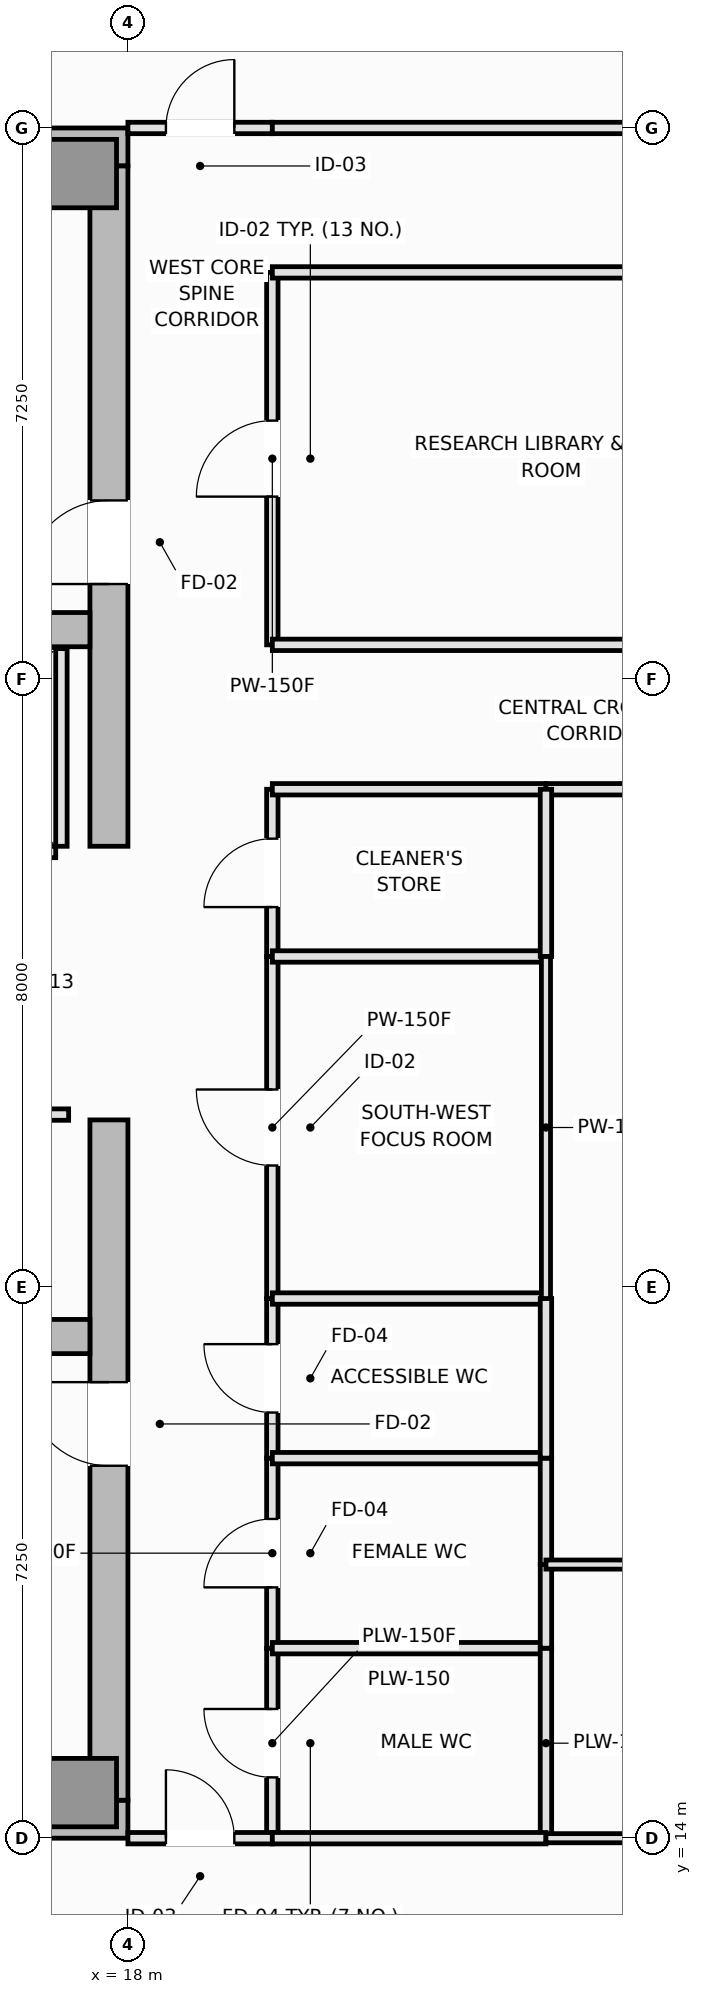
"""IFC4 building model, lengths in metres.
Left out: names, types, materials, properties, quantities, classifications, styles, units other than length and angle.
Written with IfcOpenShell. Run it as: python <this file> out.ifc"""

import sys

from ifc_helpers import new_model, si_unit, direction, frame, frame_2d, origin, origin_2d, place, context, subcontext, project, spatial, rectangle, extrude, element, fill, save


model = new_model("IFC4")
c1 = context("Model", 3, precision=1e-05, world=origin(), true_north=direction((0.0, 1.0)))
c2 = subcontext(c1, "Body", "Model", "MODEL_VIEW")
j1 = project(units=[si_unit("LENGTHUNIT", "METRE"), si_unit("PLANEANGLEUNIT", "RADIAN")], contexts=[c1])
p1 = place(None, origin())
s1 = spatial("IfcSite", under=j1, at=p1, CompositionType="ELEMENT")
p2 = place(p1, origin())
s2 = spatial("IfcBuilding", under=s1, at=p2, CompositionType="ELEMENT")
p3 = place(p2, frame((0.0, 0.0, 284.75)))
s3 = spatial("IfcBuildingStorey", under=s2, at=p3, CompositionType="ELEMENT", Elevation=284.75)
for number, where, z_axis, x_axis in (
    (1, (4.5, 14.25, 0.0), (0.0, 0.0, 1.0), (1.0, 0.0, 0.0)),
    (2, (4.5, 36.25, 0.0), (0.0, 0.0, 1.0), (1.0, 0.0, 0.0)),
):
    element("IfcWall", number, at=place(p3, frame(where, z_axis=z_axis, x_axis=x_axis)), inside=s3, PredefinedType="SHEAR", context=c2, shape_type="SweptSolid", body=[
        extrude(rectangle(XDim=13.5, YDim=0.5, at=frame_2d((6.75, 0.0))), origin(), (0.0, 0.0, 1.0), 3.55),
    ])
p4 = place(p3, frame((17.75, 14.5, 0.0), z_axis=(0.0, 0.0, 1.0), x_axis=(0.0, 1.0, 0.0)))
e3 = element("IfcWall", 3, at=p4, inside=s3, PredefinedType="SHEAR", context=c2, shape_type="SweptSolid", body=[
    extrude(rectangle(XDim=8.95, YDim=0.5, at=frame_2d((4.475, 0.0))), origin(), (0.0, 0.0, 1.0), 3.55),
])
p5 = place(p4, frame((4.4, 0.0, 0.0)))
e4 = element("IfcOpeningElement", 4, at=p5, cuts=e3, PredefinedType="OPENING", context=c2, shape_type="SweptSolid", body=[
    extrude(rectangle(XDim=1.1, YDim=2.15, at=frame_2d((0.55, 1.075))), frame((0.0, 0.26, 0.0), z_axis=(0.0, -1.0, 0.0), x_axis=(1.0, 0.0, 0.0)), (0.0, 0.0, 1.0), 0.52),
])
p6 = place(p3, frame((17.75, 27.05, 0.0), z_axis=(0.0, 0.0, 1.0), x_axis=(0.0, 1.0, 0.0)))
e5 = element("IfcWall", 5, at=p6, inside=s3, PredefinedType="SHEAR", context=c2, shape_type="SweptSolid", body=[
    extrude(rectangle(XDim=8.95, YDim=0.5, at=frame_2d((4.475, 0.0))), origin(), (0.0, 0.0, 1.0), 3.55),
])
p7 = place(p6, frame((3.45, 0.0, 0.0)))
e6 = element("IfcOpeningElement", 6, at=p7, cuts=e5, PredefinedType="OPENING", context=c2, shape_type="SweptSolid", body=[
    extrude(rectangle(XDim=1.1, YDim=2.15, at=frame_2d((0.55, 1.075))), frame((0.0, 0.26, 0.0), z_axis=(0.0, -1.0, 0.0), x_axis=(1.0, 0.0, 0.0)), (0.0, 0.0, 1.0), 0.52),
])
for number, where, z_axis, x_axis in (
    (7, (5.0, 20.6, 0.0), (0.0, 0.0, 1.0), (1.0, 0.0, 0.0)),
    (8, (5.0, 29.9, 0.0), (0.0, 0.0, 1.0), (1.0, 0.0, 0.0)),
):
    element("IfcWall", number, at=place(p3, frame(where, z_axis=z_axis, x_axis=x_axis)), inside=s3, PredefinedType="SHEAR", context=c2, shape_type="SweptSolid", body=[
        extrude(rectangle(XDim=12.5, YDim=0.45, at=frame_2d((6.25, 0.0))), origin(), (0.0, 0.0, 1.0), 3.55),
    ])
for number, where, z_axis, x_axis in (
    (9, (17.4, 14.6, 0.0), (0.0, 0.0, 1.0), (1.0, 0.0, 0.0)),
    (10, (17.4, 35.9, 0.0), (0.0, 0.0, 1.0), (1.0, 0.0, 0.0)),
):
    element("IfcColumn", number, at=place(p3, frame(where, z_axis=z_axis, x_axis=x_axis)), inside=s3, PredefinedType="PILASTER", context=c2, shape_type="SweptSolid", body=[
        extrude(rectangle(XDim=0.9, YDim=0.9, at=origin_2d()), origin(), (0.0, 0.0, 1.0), 3.55),
    ])
p8 = place(p3, frame((14.5, 26.975, 0.0), z_axis=(0.0, 0.0, 1.0), x_axis=(1.0, 0.0, 0.0)))
e11 = element("IfcWall", 11, at=p8, inside=s3, PredefinedType="PARTITIONING", context=c2, shape_type="SweptSolid", body=[
    extrude(rectangle(XDim=2.55, YDim=0.15, at=frame_2d((1.275, 0.0))), origin(), (0.0, 0.0, 1.0), 3.39),
])
p9 = place(p8, frame((0.625, 0.0, 0.0)))
e12 = element("IfcOpeningElement", 12, at=p9, cuts=e11, PredefinedType="OPENING", context=c2, shape_type="SweptSolid", body=[
    extrude(rectangle(XDim=1.3, YDim=2.2, at=frame_2d((0.65, 1.1))), frame((0.0, 0.085, 0.0), z_axis=(0.0, -1.0, 0.0), x_axis=(1.0, 0.0, 0.0)), (0.0, 0.0, 1.0), 0.17),
])
p10 = place(p3, frame((17.125, 27.05, 0.0), z_axis=(0.0, 0.0, 1.0), x_axis=(0.0, 1.0, 0.0)))
e13 = element("IfcWall", 13, at=p10, inside=s3, PredefinedType="PARTITIONING", context=c2, shape_type="SweptSolid", body=[
    extrude(rectangle(XDim=2.6, YDim=0.15, at=frame_2d((1.3, 0.0))), origin(), (0.0, 0.0, 1.0), 3.39),
])
p11 = place(p3, frame((14.33, 23.52, 0.0), z_axis=(0.0, 0.0, 1.0), x_axis=(1.0, 0.0, 0.0)))
e14 = element("IfcWall", 14, at=p11, inside=s3, PredefinedType="PARTITIONING", context=c2, shape_type="SweptSolid", body=[
    extrude(rectangle(XDim=2.89, YDim=0.15, at=frame_2d((1.445, 0.0))), origin(), (0.0, 0.0, 1.0), 3.39),
])
p12 = place(p11, frame((1.053, 0.0, 0.0)))
e15 = element("IfcOpeningElement", 15, at=p12, cuts=e14, PredefinedType="OPENING", context=c2, shape_type="SweptSolid", body=[
    extrude(rectangle(XDim=0.9, YDim=2.1, at=frame_2d((0.45, 1.05))), frame((0.0, 0.085, 0.0), z_axis=(0.0, -1.0, 0.0), x_axis=(1.0, 0.0, 0.0)), (0.0, 0.0, 1.0), 0.17),
])
p13 = place(p3, frame((19.9, 29.7, 0.0), z_axis=(0.0, 0.0, 1.0), x_axis=(0.0, 1.0, 0.0)))
e16 = element("IfcWall", 16, at=p13, inside=s3, PredefinedType="PARTITIONING", context=c2, shape_type="SweptSolid", body=[
    extrude(rectangle(XDim=4.9, YDim=0.15, at=frame_2d((2.45, 0.0))), origin(), (0.0, 0.0, 1.0), 3.39),
])
p14 = place(p13, frame((1.95, 0.0, 0.0)))
e17 = element("IfcOpeningElement", 17, at=p14, cuts=e16, PredefinedType="OPENING", context=c2, shape_type="SweptSolid", body=[
    extrude(rectangle(XDim=1.0, YDim=2.15, at=frame_2d((0.5, 1.075))), frame((0.0, 0.085, 0.0), z_axis=(0.0, -1.0, 0.0), x_axis=(1.0, 0.0, 0.0)), (0.0, 0.0, 1.0), 0.17),
])
p15 = place(p3, frame((19.9, 14.0, 0.0), z_axis=(0.0, 0.0, 1.0), x_axis=(0.0, 1.0, 0.0)))
e18 = element("IfcWall", 18, at=p15, inside=s3, PredefinedType="PLUMBINGWALL", context=c2, shape_type="SweptSolid", body=[
    extrude(rectangle(XDim=2.5, YDim=0.15, at=frame_2d((1.25, 0.0))), origin(), (0.0, 0.0, 1.0), 3.39),
])
p16 = place(p15, frame((0.8, 0.0, 0.0)))
e19 = element("IfcOpeningElement", 19, at=p16, cuts=e18, PredefinedType="OPENING", context=c2, shape_type="SweptSolid", body=[
    extrude(rectangle(XDim=0.9, YDim=2.1, at=frame_2d((0.45, 1.05))), frame((0.0, 0.085, 0.0), z_axis=(0.0, -1.0, 0.0), x_axis=(1.0, 0.0, 0.0)), (0.0, 0.0, 1.0), 0.17),
])
p17 = place(p3, frame((19.9, 16.5, 0.0), z_axis=(0.0, 0.0, 1.0), x_axis=(0.0, 1.0, 0.0)))
e20 = element("IfcWall", 20, at=p17, inside=s3, PredefinedType="PLUMBINGWALL", context=c2, shape_type="SweptSolid", body=[
    extrude(rectangle(XDim=2.5, YDim=0.15, at=frame_2d((1.25, 0.0))), origin(), (0.0, 0.0, 1.0), 3.39),
])
p18 = place(p17, frame((0.8, 0.0, 0.0)))
e21 = element("IfcOpeningElement", 21, at=p18, cuts=e20, PredefinedType="OPENING", context=c2, shape_type="SweptSolid", body=[
    extrude(rectangle(XDim=0.9, YDim=2.1, at=frame_2d((0.45, 1.05))), frame((0.0, 0.085, 0.0), z_axis=(0.0, -1.0, 0.0), x_axis=(1.0, 0.0, 0.0)), (0.0, 0.0, 1.0), 0.17),
])
p19 = place(p3, frame((19.9, 19.0, 0.0), z_axis=(0.0, 0.0, 1.0), x_axis=(0.0, 1.0, 0.0)))
e22 = element("IfcWall", 22, at=p19, inside=s3, PredefinedType="PLUMBINGWALL", context=c2, shape_type="SweptSolid", body=[
    extrude(rectangle(XDim=2.1, YDim=0.15, at=frame_2d((1.05, 0.0))), origin(), (0.0, 0.0, 1.0), 3.39),
])
p20 = place(p19, frame((0.6, 0.0, 0.0)))
e23 = element("IfcOpeningElement", 23, at=p20, cuts=e22, PredefinedType="OPENING", context=c2, shape_type="SweptSolid", body=[
    extrude(rectangle(XDim=0.9, YDim=2.1, at=frame_2d((0.45, 1.05))), frame((0.0, 0.085, 0.0), z_axis=(0.0, -1.0, 0.0), x_axis=(1.0, 0.0, 0.0)), (0.0, 0.0, 1.0), 0.17),
])
p21 = place(p3, frame((19.9, 25.6, 0.0), z_axis=(0.0, 0.0, 1.0), x_axis=(0.0, 1.0, 0.0)))
e24 = element("IfcWall", 24, at=p21, inside=s3, PredefinedType="PLUMBINGWALL", context=c2, shape_type="SweptSolid", body=[
    extrude(rectangle(XDim=2.2, YDim=0.15, at=frame_2d((1.1, 0.0))), origin(), (0.0, 0.0, 1.0), 3.39),
])
p22 = place(p21, frame((0.65, 0.0, 0.0)))
e25 = element("IfcOpeningElement", 25, at=p22, cuts=e24, PredefinedType="OPENING", context=c2, shape_type="SweptSolid", body=[
    extrude(rectangle(XDim=0.9, YDim=2.1, at=frame_2d((0.45, 1.05))), frame((0.0, 0.085, 0.0), z_axis=(0.0, -1.0, 0.0), x_axis=(1.0, 0.0, 0.0)), (0.0, 0.0, 1.0), 0.17),
])
p23 = place(p3, frame((19.9, 21.1, 0.0), z_axis=(0.0, 0.0, 1.0), x_axis=(0.0, 1.0, 0.0)))
e26 = element("IfcWall", 26, at=p23, inside=s3, PredefinedType="PARTITIONING", context=c2, shape_type="SweptSolid", body=[
    extrude(rectangle(XDim=4.5, YDim=0.15, at=frame_2d((2.25, 0.0))), origin(), (0.0, 0.0, 1.0), 3.39),
])
p24 = place(p23, frame((1.75, 0.0, 0.0)))
e27 = element("IfcOpeningElement", 27, at=p24, cuts=e26, PredefinedType="OPENING", context=c2, shape_type="SweptSolid", body=[
    extrude(rectangle(XDim=1.0, YDim=2.15, at=frame_2d((0.5, 1.075))), frame((0.0, 0.085, 0.0), z_axis=(0.0, -1.0, 0.0), x_axis=(1.0, 0.0, 0.0)), (0.0, 0.0, 1.0), 0.17),
])
p25 = place(p3, frame((18.0, 14.0, 0.0), z_axis=(0.0, 0.0, 1.0), x_axis=(1.0, 0.0, 0.0)))
e28 = element("IfcWall", 28, at=p25, inside=s3, PredefinedType="PARTITIONING", context=c2, shape_type="SweptSolid", body=[
    extrude(rectangle(XDim=1.9, YDim=0.15, at=frame_2d((0.95, 0.0))), origin(), (0.0, 0.0, 1.0), 3.39),
])
p26 = place(p25, frame((0.5, 0.0, 0.0)))
e29 = element("IfcOpeningElement", 29, at=p26, cuts=e28, PredefinedType="OPENING", context=c2, shape_type="SweptSolid", body=[
    extrude(rectangle(XDim=0.9, YDim=2.1, at=frame_2d((0.45, 1.05))), frame((0.0, 0.085, 0.0), z_axis=(0.0, -1.0, 0.0), x_axis=(1.0, 0.0, 0.0)), (0.0, 0.0, 1.0), 0.17),
])
p27 = place(p3, frame((18.0, 36.5, 0.0), z_axis=(0.0, 0.0, 1.0), x_axis=(1.0, 0.0, 0.0)))
e30 = element("IfcWall", 30, at=p27, inside=s3, PredefinedType="PARTITIONING", context=c2, shape_type="SweptSolid", body=[
    extrude(rectangle(XDim=1.9, YDim=0.15, at=frame_2d((0.95, 0.0))), origin(), (0.0, 0.0, 1.0), 3.39),
])
p28 = place(p27, frame((0.5, 0.0, 0.0)))
e31 = element("IfcOpeningElement", 31, at=p28, cuts=e30, PredefinedType="OPENING", context=c2, shape_type="SweptSolid", body=[
    extrude(rectangle(XDim=0.9, YDim=2.1, at=frame_2d((0.45, 1.05))), frame((0.0, 0.085, 0.0), z_axis=(0.0, -1.0, 0.0), x_axis=(1.0, 0.0, 0.0)), (0.0, 0.0, 1.0), 0.17),
])
p29 = place(p3, frame((19.9, 29.7, 0.0), z_axis=(0.0, 0.0, 1.0), x_axis=(1.0, 0.0, 0.0)))
e32 = element("IfcWall", 32, at=p29, inside=s3, PredefinedType="PARTITIONING", context=c2, shape_type="SweptSolid", body=[
    extrude(rectangle(XDim=6.89, YDim=0.15, at=frame_2d((3.445, 0.0))), origin(), (0.0, 0.0, 1.0), 3.39),
])
p30 = place(p3, frame((19.9, 27.8, 0.0), z_axis=(0.0, 0.0, 1.0), x_axis=(1.0, 0.0, 0.0)))
e33 = element("IfcWall", 33, at=p30, inside=s3, PredefinedType="PLUMBINGWALL", context=c2, shape_type="SweptSolid", body=[
    extrude(rectangle(XDim=3.6, YDim=0.15, at=frame_2d((1.8, 0.0))), origin(), (0.0, 0.0, 1.0), 3.39),
])
p31 = place(p3, frame((23.5, 27.8, 0.0), z_axis=(0.0, 0.0, 1.0), x_axis=(1.0, 0.0, 0.0)))
e34 = element("IfcWall", 34, at=p31, inside=s3, PredefinedType="PARTITIONING", context=c2, shape_type="SweptSolid", body=[
    extrude(rectangle(XDim=12.8, YDim=0.15, at=frame_2d((6.4, 0.0))), origin(), (0.0, 0.0, 1.0), 3.39),
])
p32 = place(p31, frame((5.9, 0.0, 0.0)))
e35 = element("IfcOpeningElement", 35, at=p32, cuts=e34, PredefinedType="OPENING", context=c2, shape_type="SweptSolid", body=[
    extrude(rectangle(XDim=1.0, YDim=2.15, at=frame_2d((0.5, 1.075))), frame((0.0, 0.085, 0.0), z_axis=(0.0, -1.0, 0.0), x_axis=(1.0, 0.0, 0.0)), (0.0, 0.0, 1.0), 0.17),
])
p33 = place(p3, frame((19.9, 34.6, 0.0), z_axis=(0.0, 0.0, 1.0), x_axis=(1.0, 0.0, 0.0)))
e36 = element("IfcWall", 36, at=p33, inside=s3, PredefinedType="PARTITIONING", context=c2, shape_type="SweptSolid", body=[
    extrude(rectangle(XDim=6.89, YDim=0.15, at=frame_2d((3.445, 0.0))), origin(), (0.0, 0.0, 1.0), 3.39),
])
p34 = place(p3, frame((19.9, 36.5, 0.0), z_axis=(0.0, 0.0, 1.0), x_axis=(1.0, 0.0, 0.0)))
e37 = element("IfcWall", 37, at=p34, inside=s3, PredefinedType="PARTITIONING", context=c2, shape_type="SweptSolid", body=[
    extrude(rectangle(XDim=9.9, YDim=0.15, at=frame_2d((4.95, 0.0))), origin(), (0.0, 0.0, 1.0), 3.39),
])
p35 = place(p3, frame((19.9, 16.5, 0.0), z_axis=(0.0, 0.0, 1.0), x_axis=(1.0, 0.0, 0.0)))
e38 = element("IfcWall", 38, at=p35, inside=s3, PredefinedType="PLUMBINGWALL", context=c2, shape_type="SweptSolid", body=[
    extrude(rectangle(XDim=3.6, YDim=0.15, at=frame_2d((1.8, 0.0))), origin(), (0.0, 0.0, 1.0), 3.39),
])
p36 = place(p3, frame((23.5, 14.0, 0.0), z_axis=(0.0, 0.0, 1.0), x_axis=(0.0, 1.0, 0.0)))
e39 = element("IfcWall", 39, at=p36, inside=s3, PredefinedType="PLUMBINGWALL", context=c2, shape_type="SweptSolid", body=[
    extrude(rectangle(XDim=2.5, YDim=0.15, at=frame_2d((1.25, 0.0))), origin(), (0.0, 0.0, 1.0), 3.39),
])
for number, where, z_axis, x_axis in (
    (40, (19.9, 14.0, 0.0), (0.0, 0.0, 1.0), (1.0, 0.0, 0.0)),
    (41, (19.9, 19.0, 0.0), (0.0, 0.0, 1.0), (1.0, 0.0, 0.0)),
):
    element("IfcWall", number, at=place(p3, frame(where, z_axis=z_axis, x_axis=x_axis)), inside=s3, PredefinedType="PLUMBINGWALL", context=c2, shape_type="SweptSolid", body=[
        extrude(rectangle(XDim=3.6, YDim=0.15, at=frame_2d((1.8, 0.0))), origin(), (0.0, 0.0, 1.0), 3.39),
    ])
p37 = place(p3, frame((23.5, 16.5, 0.0), z_axis=(0.0, 0.0, 1.0), x_axis=(0.0, 1.0, 0.0)))
e42 = element("IfcWall", 42, at=p37, inside=s3, PredefinedType="PLUMBINGWALL", context=c2, shape_type="SweptSolid", body=[
    extrude(rectangle(XDim=1.1, YDim=0.15, at=frame_2d((0.55, 0.0))), origin(), (0.0, 0.0, 1.0), 3.39),
])
p38 = place(p3, frame((23.5, 17.6, 0.0), z_axis=(0.0, 0.0, 1.0), x_axis=(0.0, 1.0, 0.0)))
e43 = element("IfcWall", 43, at=p38, inside=s3, PredefinedType="PLUMBINGWALL", context=c2, shape_type="SweptSolid", body=[
    extrude(rectangle(XDim=1.4, YDim=0.15, at=frame_2d((0.7, 0.0))), origin(), (0.0, 0.0, 1.0), 3.39),
])
p39 = place(p3, frame((19.9, 21.1, 0.0), z_axis=(0.0, 0.0, 1.0), x_axis=(1.0, 0.0, 0.0)))
e44 = element("IfcWall", 44, at=p39, inside=s3, PredefinedType="PLUMBINGWALL", context=c2, shape_type="SweptSolid", body=[
    extrude(rectangle(XDim=3.6, YDim=0.15, at=frame_2d((1.8, 0.0))), origin(), (0.0, 0.0, 1.0), 3.39),
])
p40 = place(p3, frame((23.5, 19.0, 0.0), z_axis=(0.0, 0.0, 1.0), x_axis=(0.0, 1.0, 0.0)))
e45 = element("IfcWall", 45, at=p40, inside=s3, PredefinedType="PLUMBINGWALL", context=c2, shape_type="SweptSolid", body=[
    extrude(rectangle(XDim=2.1, YDim=0.15, at=frame_2d((1.05, 0.0))), origin(), (0.0, 0.0, 1.0), 3.39),
])
p41 = place(p3, frame((19.9, 25.6, 0.0), z_axis=(0.0, 0.0, 1.0), x_axis=(1.0, 0.0, 0.0)))
e46 = element("IfcWall", 46, at=p41, inside=s3, PredefinedType="PLUMBINGWALL", context=c2, shape_type="SweptSolid", body=[
    extrude(rectangle(XDim=3.6, YDim=0.15, at=frame_2d((1.8, 0.0))), origin(), (0.0, 0.0, 1.0), 3.39),
])
p42 = place(p3, frame((23.5, 25.6, 0.0), z_axis=(0.0, 0.0, 1.0), x_axis=(0.0, 1.0, 0.0)))
e47 = element("IfcWall", 47, at=p42, inside=s3, PredefinedType="PLUMBINGWALL", context=c2, shape_type="SweptSolid", body=[
    extrude(rectangle(XDim=2.2, YDim=0.15, at=frame_2d((1.1, 0.0))), origin(), (0.0, 0.0, 1.0), 3.39),
])
p43 = place(p3, frame((23.5, 21.1, 0.0), z_axis=(0.0, 0.0, 1.0), x_axis=(0.0, 1.0, 0.0)))
e48 = element("IfcWall", 48, at=p43, inside=s3, PredefinedType="PARTITIONING", context=c2, shape_type="SweptSolid", body=[
    extrude(rectangle(XDim=4.5, YDim=0.12, at=frame_2d((2.25, 0.0))), origin(), (0.0, 0.0, 1.0), 3.39),
])
for number, where, z_axis, x_axis in (
    (49, (23.5, 17.6, 0.0), (0.0, 0.0, 1.0), (1.0, 0.0, 0.0)),
    (50, (23.5, 14.0, 0.0), (0.0, 0.0, 1.0), (1.0, 0.0, 0.0)),
):
    element("IfcWall", number, at=place(p3, frame(where, z_axis=z_axis, x_axis=x_axis)), inside=s3, PredefinedType="PARTITIONING", context=c2, shape_type="SweptSolid", body=[
        extrude(rectangle(XDim=12.8, YDim=0.12, at=frame_2d((6.4, 0.0))), origin(), (0.0, 0.0, 1.0), 3.39),
    ])
p44 = place(p5, origin())
e51 = element("IfcDoor", 51, at=p44, inside=s3, OperationType="SINGLE_SWING_RIGHT", PredefinedType="DOOR", context=c2, shape_type="SweptSolid", body=[
    extrude(rectangle(XDim=1.1, YDim=2.15, at=frame_2d((0.55, 1.075))), frame((0.0, 0.025, 0.0), z_axis=(0.0, -1.0, 0.0), x_axis=(1.0, 0.0, 0.0)), (0.0, 0.0, 1.0), 0.05),
])
fill(e4, e51)
p45 = place(p7, origin())
e52 = element("IfcDoor", 52, at=p45, inside=s3, OperationType="SINGLE_SWING_LEFT", PredefinedType="DOOR", context=c2, shape_type="SweptSolid", body=[
    extrude(rectangle(XDim=1.1, YDim=2.15, at=frame_2d((0.55, 1.075))), frame((0.0, 0.025, 0.0), z_axis=(0.0, -1.0, 0.0), x_axis=(1.0, 0.0, 0.0)), (0.0, 0.0, 1.0), 0.05),
])
fill(e6, e52)
p46 = place(p14, origin())
e53 = element("IfcDoor", 53, at=p46, inside=s3, OperationType="SINGLE_SWING_LEFT", PredefinedType="DOOR", context=c2, shape_type="SweptSolid", body=[
    extrude(rectangle(XDim=1.0, YDim=2.15, at=frame_2d((0.5, 1.075))), frame((0.0, 0.025, 0.0), z_axis=(0.0, -1.0, 0.0), x_axis=(1.0, 0.0, 0.0)), (0.0, 0.0, 1.0), 0.05),
])
fill(e17, e53)
p47 = place(p16, origin())
e54 = element("IfcDoor", 54, at=p47, inside=s3, OperationType="SINGLE_SWING_RIGHT", PredefinedType="DOOR", context=c2, shape_type="SweptSolid", body=[
    extrude(rectangle(XDim=0.9, YDim=2.1, at=frame_2d((0.45, 1.05))), frame((0.0, 0.025, 0.0), z_axis=(0.0, -1.0, 0.0), x_axis=(1.0, 0.0, 0.0)), (0.0, 0.0, 1.0), 0.05),
])
fill(e19, e54)
p48 = place(p18, origin())
e55 = element("IfcDoor", 55, at=p48, inside=s3, OperationType="SINGLE_SWING_LEFT", PredefinedType="DOOR", context=c2, shape_type="SweptSolid", body=[
    extrude(rectangle(XDim=0.9, YDim=2.1, at=frame_2d((0.45, 1.05))), frame((0.0, 0.025, 0.0), z_axis=(0.0, -1.0, 0.0), x_axis=(1.0, 0.0, 0.0)), (0.0, 0.0, 1.0), 0.05),
])
fill(e21, e55)
p49 = place(p20, origin())
e56 = element("IfcDoor", 56, at=p49, inside=s3, OperationType="SINGLE_SWING_RIGHT", PredefinedType="DOOR", context=c2, shape_type="SweptSolid", body=[
    extrude(rectangle(XDim=0.9, YDim=2.1, at=frame_2d((0.45, 1.05))), frame((0.0, 0.025, 0.0), z_axis=(0.0, -1.0, 0.0), x_axis=(1.0, 0.0, 0.0)), (0.0, 0.0, 1.0), 0.05),
])
fill(e23, e56)
p50 = place(p22, origin())
e57 = element("IfcDoor", 57, at=p50, inside=s3, OperationType="SINGLE_SWING_LEFT", PredefinedType="DOOR", context=c2, shape_type="SweptSolid", body=[
    extrude(rectangle(XDim=0.9, YDim=2.1, at=frame_2d((0.45, 1.05))), frame((0.0, 0.025, 0.0), z_axis=(0.0, -1.0, 0.0), x_axis=(1.0, 0.0, 0.0)), (0.0, 0.0, 1.0), 0.05),
])
fill(e25, e57)
p51 = place(p24, origin())
e58 = element("IfcDoor", 58, at=p51, inside=s3, OperationType="SINGLE_SWING_RIGHT", PredefinedType="DOOR", context=c2, shape_type="SweptSolid", body=[
    extrude(rectangle(XDim=1.0, YDim=2.15, at=frame_2d((0.5, 1.075))), frame((0.0, 0.025, 0.0), z_axis=(0.0, -1.0, 0.0), x_axis=(1.0, 0.0, 0.0)), (0.0, 0.0, 1.0), 0.05),
])
fill(e27, e58)
p52 = place(p26, origin())
e59 = element("IfcDoor", 59, at=p52, inside=s3, OperationType="SINGLE_SWING_LEFT", PredefinedType="DOOR", context=c2, shape_type="SweptSolid", body=[
    extrude(rectangle(XDim=0.9, YDim=2.1, at=frame_2d((0.45, 1.05))), frame((0.0, 0.025, 0.0), z_axis=(0.0, -1.0, 0.0), x_axis=(1.0, 0.0, 0.0)), (0.0, 0.0, 1.0), 0.05),
])
fill(e29, e59)
p53 = place(p28, origin())
e60 = element("IfcDoor", 60, at=p53, inside=s3, OperationType="SINGLE_SWING_RIGHT", PredefinedType="DOOR", context=c2, shape_type="SweptSolid", body=[
    extrude(rectangle(XDim=0.9, YDim=2.1, at=frame_2d((0.45, 1.05))), frame((0.0, 0.025, 0.0), z_axis=(0.0, -1.0, 0.0), x_axis=(1.0, 0.0, 0.0)), (0.0, 0.0, 1.0), 0.05),
])
fill(e31, e60)
save(model, sys.argv[1])
